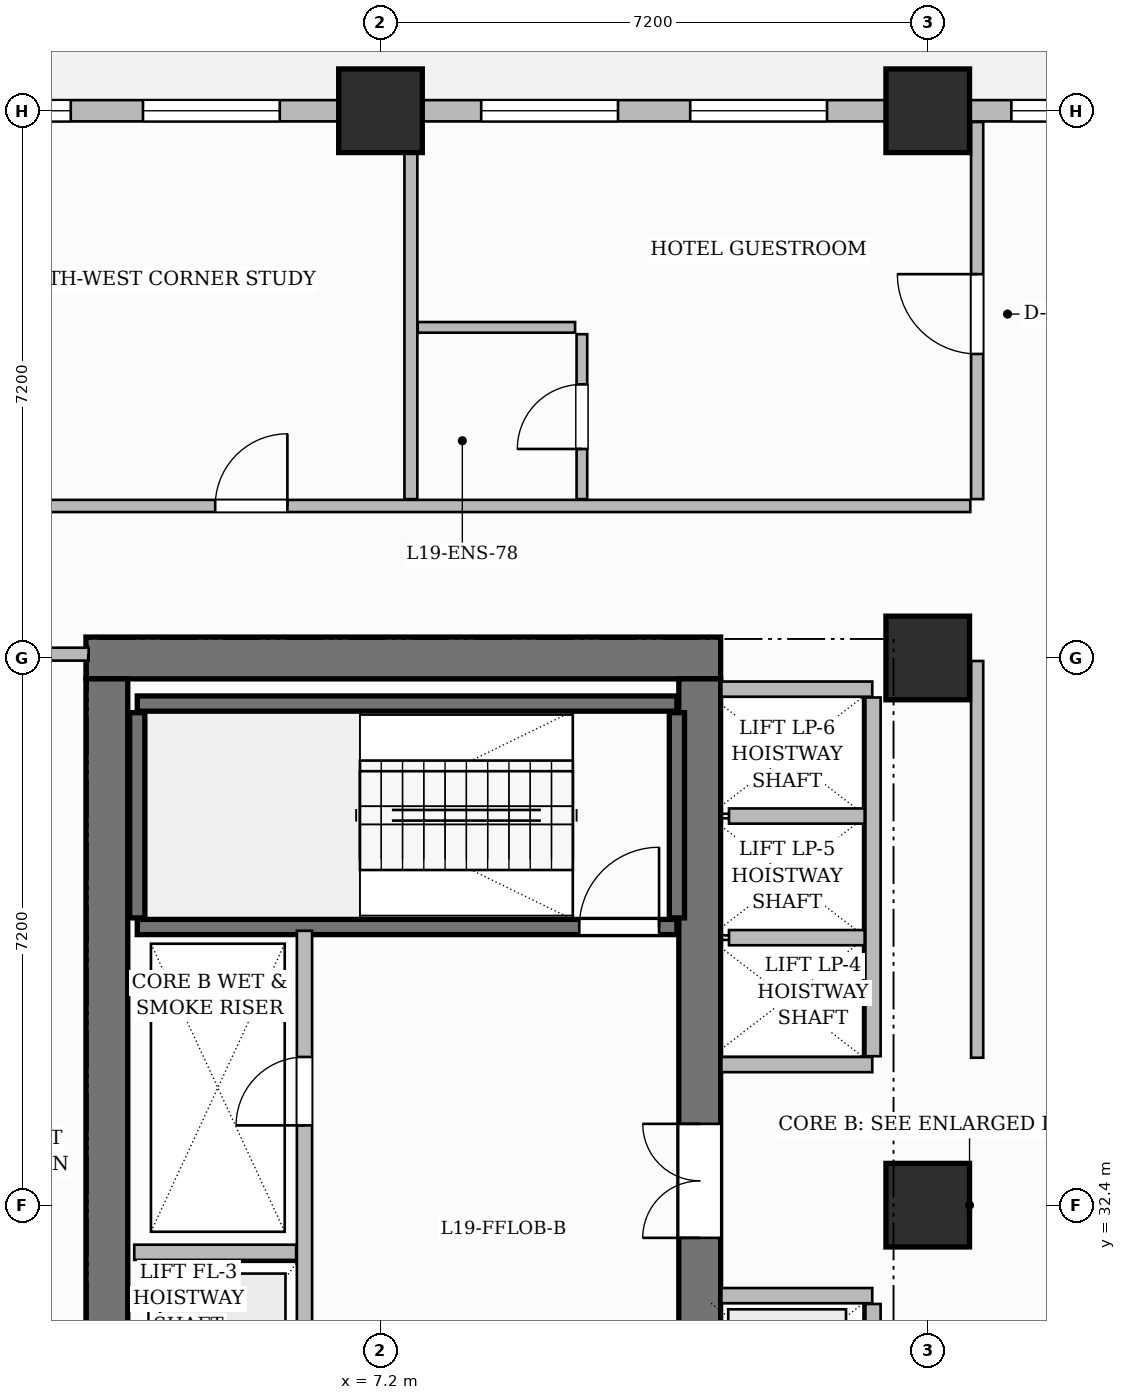
"""IFC4 building model, lengths in metres.
Left out: names, types, materials, properties, quantities, classifications, styles, units other than length and angle.
Written with IfcOpenShell. Run it as: python <this file> out.ifc"""

import sys

from ifc_helpers import new_model, si_unit, direction, frame, frame_2d, origin, origin_2d, place, context, subcontext, project, spatial, rectangle, extrude, source, transform, mapped, element, fill, save


model = new_model("IFC4")
c1 = context("Model", 3, precision=1e-05, world=origin(), true_north=direction((0.0, 1.0)))
c2 = subcontext(c1, "Body", "Model", "MODEL_VIEW")
j1 = project(units=[si_unit("LENGTHUNIT", "METRE"), si_unit("PLANEANGLEUNIT", "RADIAN")], contexts=[c1])
p1 = place(None, origin())
s1 = spatial("IfcSite", under=j1, at=p1, CompositionType="ELEMENT")
p2 = place(p1, origin())
s2 = spatial("IfcBuilding", under=s1, at=p2, CompositionType="ELEMENT")
p3 = place(p2, frame((0.0, 0.0, 80.5)))
s3 = spatial("IfcBuildingStorey", under=s2, at=p3, CompositionType="ELEMENT", Elevation=80.5)
p4 = place(p3, frame((3.325, 39.6, 0.0), z_axis=(0.0, 0.0, 1.0), x_axis=(1.0, 0.0, 0.0)))
e1 = element("IfcWall", 1, at=p4, inside=s3, PredefinedType="SHEAR", context=c2, shape_type="SweptSolid", body=[
    extrude(rectangle(XDim=8.35, YDim=0.55, at=frame_2d((4.175, 0.0))), origin(), (0.0, 0.0, 1.0), 3.7),
])
p5 = place(p3, frame((3.6, 25.475, 0.0), z_axis=(0.0, 0.0, 1.0), x_axis=(0.0, 1.0, 0.0)))
e2 = element("IfcWall", 2, at=p5, inside=s3, PredefinedType="SHEAR", context=c2, shape_type="SweptSolid", body=[
    extrude(rectangle(XDim=13.85, YDim=0.55, at=frame_2d((6.925, 0.0))), origin(), (0.0, 0.0, 1.0), 3.7),
])
p6 = place(p3, frame((11.4, 25.475, 0.0), z_axis=(0.0, 0.0, 1.0), x_axis=(0.0, 1.0, 0.0)))
e3 = element("IfcWall", 3, at=p6, inside=s3, PredefinedType="SHEAR", context=c2, shape_type="SweptSolid", body=[
    extrude(rectangle(XDim=13.85, YDim=0.55, at=frame_2d((6.925, 0.0))), origin(), (0.0, 0.0, 1.0), 3.7),
])
p7 = place(p6, frame((6.495, 0.0, 0.0)))
e4 = element("IfcOpeningElement", 4, at=p7, cuts=e3, PredefinedType="OPENING", context=c2, shape_type="SweptSolid", body=[
    extrude(rectangle(XDim=1.5, YDim=2.2, at=frame_2d((0.75, 1.1))), frame((0.0, 0.285, 0.0), z_axis=(0.0, -1.0, 0.0), x_axis=(1.0, 0.0, 0.0)), (0.0, 0.0, 1.0), 0.57),
])
m1 = source(origin(), c2, "Body", "SweptSolid", [
    extrude(rectangle(XDim=1.1, YDim=1.1, at=origin_2d()), origin(), (0.0, 0.0, 1.0), 3.7),
])
for number, where, z_axis, x_axis in (
    (5, (7.2, 46.8, 0.0), (0.0, 0.0, 1.0), (1.0, 0.0, 0.0)),
    (6, (14.4, 32.4, 0.0), (0.0, 0.0, 1.0), (1.0, 0.0, 0.0)),
    (7, (14.4, 39.6, 0.0), (0.0, 0.0, 1.0), (1.0, 0.0, 0.0)),
    (8, (14.4, 46.8, 0.0), (0.0, 0.0, 1.0), (1.0, 0.0, 0.0)),
):
    element("IfcColumn", number, at=place(p3, frame(where, z_axis=z_axis, x_axis=x_axis)), inside=s3, PredefinedType="COLUMN", context=c2, shape_type="MappedRepresentation", body=[
        mapped(m1, transform((0.0, 0.0, 0.0), scale=1.0)),
    ])
p8 = place(p3, frame((4.0, 39.0, 0.0), z_axis=(0.0, 0.0, 1.0), x_axis=(1.0, 0.0, 0.0)))
e9 = element("IfcWall", 9, at=p8, inside=s3, PredefinedType="SHEAR", context=c2, shape_type="SweptSolid", body=[
    extrude(rectangle(XDim=7.1, YDim=0.2, at=frame_2d((3.55, 0.0))), origin(), (0.0, 0.0, 1.0), 3.7),
])
for number, where, z_axis, x_axis in (
    (10, (4.0, 36.18, 0.0), (0.0, 0.0, 1.0), (0.0, 1.0, 0.0)),
    (11, (11.1, 36.18, 0.0), (0.0, 0.0, 1.0), (0.0, 1.0, 0.0)),
):
    element("IfcWall", number, at=place(p3, frame(where, z_axis=z_axis, x_axis=x_axis)), inside=s3, PredefinedType="SHEAR", context=c2, shape_type="SweptSolid", body=[
        extrude(rectangle(XDim=2.7, YDim=0.2, at=frame_2d((1.35, 0.0))), origin(), (0.0, 0.0, 1.0), 3.7),
    ])
p9 = place(p3, frame((4.0, 36.06, 0.0), z_axis=(0.0, 0.0, 1.0), x_axis=(1.0, 0.0, 0.0)))
e12 = element("IfcWall", 12, at=p9, inside=s3, PredefinedType="SHEAR", context=c2, shape_type="SweptSolid", body=[
    extrude(rectangle(XDim=7.1, YDim=0.2, at=frame_2d((3.55, 0.0))), origin(), (0.0, 0.0, 1.0), 3.7),
])
p10 = place(p9, frame((5.815, 0.0, 0.0)))
e13 = element("IfcOpeningElement", 13, at=p10, cuts=e12, PredefinedType="OPENING", context=c2, shape_type="SweptSolid", body=[
    extrude(rectangle(XDim=1.05, YDim=2.2, at=frame_2d((0.525, 1.1))), frame((0.0, 0.11, 0.0), z_axis=(0.0, -1.0, 0.0), x_axis=(1.0, 0.0, 0.0)), (0.0, 0.0, 1.0), 0.22),
])
p11 = place(p3, frame((6.2, 28.79, 0.0), z_axis=(0.0, 0.0, 1.0), x_axis=(0.0, 1.0, 0.0)))
e14 = element("IfcWall", 14, at=p11, inside=s3, PredefinedType="PARTITIONING", context=c2, shape_type="SweptSolid", body=[
    extrude(rectangle(XDim=7.22, YDim=0.2, at=frame_2d((3.61, 0.0))), origin(), (0.0, 0.0, 1.0), 3.45),
])
p12 = place(p11, frame((4.66, 0.0, 0.0)))
e15 = element("IfcOpeningElement", 15, at=p12, cuts=e14, PredefinedType="OPENING", context=c2, shape_type="SweptSolid", body=[
    extrude(rectangle(XDim=0.9, YDim=2.1, at=frame_2d((0.45, 1.05))), frame((0.0, 0.11, 0.0), z_axis=(0.0, -1.0, 0.0), x_axis=(1.0, 0.0, 0.0)), (0.0, 0.0, 1.0), 0.22),
])
p13 = place(p11, frame((0.96, 0.0, 0.0)))
e16 = element("IfcOpeningElement", 16, at=p13, cuts=e14, PredefinedType="OPENING", context=c2, shape_type="SweptSolid", body=[
    extrude(rectangle(XDim=1.1, YDim=2.2, at=frame_2d((0.55, 1.1))), frame((0.0, 0.11, 0.0), z_axis=(0.0, -1.0, 0.0), x_axis=(1.0, 0.0, 0.0)), (0.0, 0.0, 1.0), 0.22),
])
p14 = place(p3, frame((3.96, 31.78, 0.0), z_axis=(0.0, 0.0, 1.0), x_axis=(1.0, 0.0, 0.0)))
e17 = element("IfcWall", 17, at=p14, inside=s3, PredefinedType="PARTITIONING", context=c2, shape_type="SweptSolid", body=[
    extrude(rectangle(XDim=2.13, YDim=0.2, at=frame_2d((1.065, 0.0))), origin(), (0.0, 0.0, 1.0), 3.45),
])
p15 = place(p3, frame((11.685, 31.21, 0.0), z_axis=(0.0, 0.0, 1.0), x_axis=(1.0, 0.0, 0.0)))
e18 = element("IfcWall", 18, at=p15, inside=s3, PredefinedType="PARTITIONING", context=c2, shape_type="SweptSolid", body=[
    extrude(rectangle(XDim=1.985, YDim=0.2, at=frame_2d((0.992, 0.0))), origin(), (0.0, 0.0, 1.0), 3.45),
])
p16 = place(p3, frame((13.68, 26.16, 0.0), z_axis=(0.0, 0.0, 1.0), x_axis=(0.0, 1.0, 0.0)))
e19 = element("IfcWall", 19, at=p16, inside=s3, PredefinedType="PARTITIONING", context=c2, shape_type="SweptSolid", body=[
    extrude(rectangle(XDim=4.94, YDim=0.2, at=frame_2d((2.47, 0.0))), origin(), (0.0, 0.0, 1.0), 3.45),
])
p17 = place(p16, frame((0.24, 0.0, 0.0)))
e20 = element("IfcOpeningElement", 20, at=p17, cuts=e19, PredefinedType="OPENING", context=c2, shape_type="SweptSolid", body=[
    extrude(rectangle(XDim=1.1, YDim=2.2, at=frame_2d((0.55, 1.1))), frame((0.0, 0.11, 0.0), z_axis=(0.0, -1.0, 0.0), x_axis=(1.0, 0.0, 0.0)), (0.0, 0.0, 1.0), 0.22),
])
p18 = place(p16, frame((1.92, 0.0, 0.0)))
e21 = element("IfcOpeningElement", 21, at=p18, cuts=e19, PredefinedType="OPENING", context=c2, shape_type="SweptSolid", body=[
    extrude(rectangle(XDim=1.1, YDim=2.2, at=frame_2d((0.55, 1.1))), frame((0.0, 0.11, 0.0), z_axis=(0.0, -1.0, 0.0), x_axis=(1.0, 0.0, 0.0)), (0.0, 0.0, 1.0), 0.22),
])
p19 = place(p16, frame((3.6, 0.0, 0.0)))
e22 = element("IfcOpeningElement", 22, at=p19, cuts=e19, PredefinedType="OPENING", context=c2, shape_type="SweptSolid", body=[
    extrude(rectangle(XDim=1.1, YDim=2.2, at=frame_2d((0.55, 1.1))), frame((0.0, 0.11, 0.0), z_axis=(0.0, -1.0, 0.0), x_axis=(1.0, 0.0, 0.0)), (0.0, 0.0, 1.0), 0.22),
])
for number, where, z_axis, x_axis in (
    (23, (11.685, 34.25, 0.0), (0.0, 0.0, 1.0), (1.0, 0.0, 0.0)),
    (24, (11.685, 39.19, 0.0), (0.0, 0.0, 1.0), (1.0, 0.0, 0.0)),
):
    element("IfcWall", number, at=place(p3, frame(where, z_axis=z_axis, x_axis=x_axis)), inside=s3, PredefinedType="PARTITIONING", context=c2, shape_type="SweptSolid", body=[
        extrude(rectangle(XDim=1.985, YDim=0.2, at=frame_2d((0.992, 0.0))), origin(), (0.0, 0.0, 1.0), 3.45),
    ])
p20 = place(p3, frame((13.68, 34.36, 0.0), z_axis=(0.0, 0.0, 1.0), x_axis=(0.0, 1.0, 0.0)))
e25 = element("IfcWall", 25, at=p20, inside=s3, PredefinedType="PARTITIONING", context=c2, shape_type="SweptSolid", body=[
    extrude(rectangle(XDim=4.72, YDim=0.2, at=frame_2d((2.36, 0.0))), origin(), (0.0, 0.0, 1.0), 3.45),
])
for number, where, z_axis, x_axis in (
    (26, (11.785, 35.92, 0.0), (0.0, 0.0, 1.0), (1.0, 0.0, 0.0)),
    (27, (11.785, 37.52, 0.0), (0.0, 0.0, 1.0), (1.0, 0.0, 0.0)),
):
    element("IfcWall", number, at=place(p3, frame(where, z_axis=z_axis, x_axis=x_axis)), inside=s3, PredefinedType="PARTITIONING", context=c2, shape_type="SweptSolid", body=[
        extrude(rectangle(XDim=1.785, YDim=0.2, at=frame_2d((0.893, 0.0))), origin(), (0.0, 0.0, 1.0), 3.45),
    ])
p21 = place(p3, frame((0.24, 39.65, 0.0), z_axis=(0.0, 0.0, 1.0), x_axis=(1.0, 0.0, 0.0)))
e28 = element("IfcWall", 28, at=p21, inside=s3, PredefinedType="PARTITIONING", context=c2, shape_type="SweptSolid", body=[
    extrude(rectangle(XDim=3.12, YDim=0.17, at=frame_2d((1.56, 0.0))), origin(), (0.0, 0.0, 1.0), 3.45),
])
p22 = place(p21, frame((1.11, 0.0, 0.0)))
e29 = element("IfcOpeningElement", 29, at=p22, cuts=e28, PredefinedType="OPENING", context=c2, shape_type="SweptSolid", body=[
    extrude(rectangle(XDim=0.9, YDim=2.15, at=frame_2d((0.45, 1.075))), frame((0.0, 0.095, 0.0), z_axis=(0.0, -1.0, 0.0), x_axis=(1.0, 0.0, 0.0)), (0.0, 0.0, 1.0), 0.19),
])
p23 = place(p3, frame((15.05, 34.34, 0.0), z_axis=(0.0, 0.0, 1.0), x_axis=(0.0, 1.0, 0.0)))
e30 = element("IfcWall", 30, at=p23, inside=s3, PredefinedType="PARTITIONING", context=c2, shape_type="SweptSolid", body=[
    extrude(rectangle(XDim=5.22, YDim=0.16, at=frame_2d((2.61, 0.0))), origin(), (0.0, 0.0, 1.0), 3.45),
])
p24 = place(p3, frame((15.05, 41.69, 0.0), z_axis=(0.0, 0.0, 1.0), x_axis=(0.0, 1.0, 0.0)))
e31 = element("IfcWall", 31, at=p24, inside=s3, PredefinedType="PARTITIONING", context=c2, shape_type="SweptSolid", body=[
    extrude(rectangle(XDim=4.962, YDim=0.16, at=frame_2d((2.481, 0.0))), origin(), (0.0, 0.0, 1.0), 3.45),
])
p25 = place(p24, frame((1.91, 0.0, 0.0)))
e32 = element("IfcOpeningElement", 32, at=p25, cuts=e31, PredefinedType="OPENING", context=c2, shape_type="SweptSolid", body=[
    extrude(rectangle(XDim=1.05, YDim=2.25, at=frame_2d((0.525, 1.125))), frame((0.0, 0.09, 0.0), z_axis=(0.0, -1.0, 0.0), x_axis=(1.0, 0.0, 0.0)), (0.0, 0.0, 1.0), 0.18),
])
p26 = place(p3, frame((7.6, 41.69, 0.0), z_axis=(0.0, 0.0, 1.0), x_axis=(0.0, 1.0, 0.0)))
e33 = element("IfcWall", 33, at=p26, inside=s3, PredefinedType="PARTITIONING", context=c2, shape_type="SweptSolid", body=[
    extrude(rectangle(XDim=4.87, YDim=0.17, at=frame_2d((2.435, 0.0))), origin(), (0.0, 0.0, 1.0), 3.45),
])
p27 = place(p3, frame((0.148, 41.6, 0.0), z_axis=(0.0, 0.0, 1.0), x_axis=(1.0, 0.0, 0.0)))
e34 = element("IfcWall", 34, at=p27, inside=s3, PredefinedType="PARTITIONING", context=c2, shape_type="SweptSolid", body=[
    extrude(rectangle(XDim=14.812, YDim=0.16, at=frame_2d((7.406, 0.0))), origin(), (0.0, 0.0, 1.0), 2.885),
])
p28 = place(p27, frame((4.877, 0.0, 0.0)))
e35 = element("IfcOpeningElement", 35, at=p28, cuts=e34, PredefinedType="OPENING", context=c2, shape_type="SweptSolid", body=[
    extrude(rectangle(XDim=0.95, YDim=2.15, at=frame_2d((0.475, 1.075))), frame((0.0, 0.09, 0.0), z_axis=(0.0, -1.0, 0.0), x_axis=(1.0, 0.0, 0.0)), (0.0, 0.0, 1.0), 0.18),
])
p29 = place(p3, frame((7.69, 43.95, 0.0), z_axis=(0.0, 0.0, 1.0), x_axis=(1.0, 0.0, 0.0)))
e36 = element("IfcWall", 36, at=p29, inside=s3, PredefinedType="PARTITIONING", context=c2, shape_type="SweptSolid", body=[
    extrude(rectangle(XDim=2.07, YDim=0.14, at=frame_2d((1.035, 0.0))), origin(), (0.0, 0.0, 1.0), 2.885),
])
p30 = place(p3, frame((9.85, 41.69, 0.0), z_axis=(0.0, 0.0, 1.0), x_axis=(0.0, 1.0, 0.0)))
e37 = element("IfcWall", 37, at=p30, inside=s3, PredefinedType="PARTITIONING", context=c2, shape_type="SweptSolid", body=[
    extrude(rectangle(XDim=2.17, YDim=0.14, at=frame_2d((1.085, 0.0))), origin(), (0.0, 0.0, 1.0), 3.45),
])
p31 = place(p30, frame((0.66, 0.0, 0.0)))
e38 = element("IfcOpeningElement", 38, at=p31, cuts=e37, PredefinedType="OPENING", context=c2, shape_type="SweptSolid", body=[
    extrude(rectangle(XDim=0.85, YDim=2.1, at=frame_2d((0.425, 1.05))), frame((0.0, 0.08, 0.0), z_axis=(0.0, -1.0, 0.0), x_axis=(1.0, 0.0, 0.0)), (0.0, 0.0, 1.0), 0.16),
])
p32 = place(p3, frame((0.0, 46.8, 0.0), z_axis=(0.0, 0.0, 1.0), x_axis=(1.0, 0.0, 0.0)))
e39 = element("IfcWall", 39, at=p32, inside=s3, PredefinedType="SOLIDWALL", context=c2, shape_type="SweptSolid", body=[
    extrude(rectangle(XDim=18.0, YDim=0.28, at=frame_2d((9.0, 0.0))), origin(), (0.0, 0.0, 1.0), 2.885),
])
p33 = place(p32, frame((1.325, 0.0, 0.8)))
e40 = element("IfcOpeningElement", 40, at=p33, cuts=e39, PredefinedType="OPENING", context=c2, shape_type="SweptSolid", body=[
    extrude(rectangle(XDim=1.8, YDim=1.85, at=frame_2d((0.9, 0.925))), frame((0.0, 0.15, 0.0), z_axis=(0.0, -1.0, 0.0), x_axis=(1.0, 0.0, 0.0)), (0.0, 0.0, 1.0), 0.3),
])
p34 = place(p32, frame((4.075, 0.0, 0.8)))
e41 = element("IfcOpeningElement", 41, at=p34, cuts=e39, PredefinedType="OPENING", context=c2, shape_type="SweptSolid", body=[
    extrude(rectangle(XDim=1.8, YDim=1.85, at=frame_2d((0.9, 0.925))), frame((0.0, 0.15, 0.0), z_axis=(0.0, -1.0, 0.0), x_axis=(1.0, 0.0, 0.0)), (0.0, 0.0, 1.0), 0.3),
])
p35 = place(p32, frame((8.525, 0.0, 0.8)))
e42 = element("IfcOpeningElement", 42, at=p35, cuts=e39, PredefinedType="OPENING", context=c2, shape_type="SweptSolid", body=[
    extrude(rectangle(XDim=1.8, YDim=1.85, at=frame_2d((0.9, 0.925))), frame((0.0, 0.15, 0.0), z_axis=(0.0, -1.0, 0.0), x_axis=(1.0, 0.0, 0.0)), (0.0, 0.0, 1.0), 0.3),
])
p36 = place(p32, frame((11.275, 0.0, 0.8)))
e43 = element("IfcOpeningElement", 43, at=p36, cuts=e39, PredefinedType="OPENING", context=c2, shape_type="SweptSolid", body=[
    extrude(rectangle(XDim=1.8, YDim=1.85, at=frame_2d((0.9, 0.925))), frame((0.0, 0.15, 0.0), z_axis=(0.0, -1.0, 0.0), x_axis=(1.0, 0.0, 0.0)), (0.0, 0.0, 1.0), 0.3),
])
p37 = place(p32, frame((15.5, 0.0, 0.8)))
e44 = element("IfcOpeningElement", 44, at=p37, cuts=e39, PredefinedType="OPENING", context=c2, shape_type="SweptSolid", body=[
    extrude(rectangle(XDim=1.4, YDim=1.85, at=frame_2d((0.7, 0.925))), frame((0.0, 0.15, 0.0), z_axis=(0.0, -1.0, 0.0), x_axis=(1.0, 0.0, 0.0)), (0.0, 0.0, 1.0), 0.3),
])
m2 = source(origin(), c2, "Body", "SweptSolid", [
    extrude(rectangle(XDim=1.05, YDim=2.2, at=frame_2d((0.525, 1.1))), frame((0.0, 0.025, 0.0), z_axis=(0.0, -1.0, 0.0), x_axis=(1.0, 0.0, 0.0)), (0.0, 0.0, 1.0), 0.05),
])
p38 = place(p10, origin())
e45 = element("IfcDoor", 45, at=p38, inside=s3, OperationType="SINGLE_SWING_RIGHT", PredefinedType="DOOR", context=c2, shape_type="MappedRepresentation", body=[
    mapped(m2, transform((0.0, 0.0, 0.0), scale=1.0)),
])
fill(e13, e45)
m3 = source(origin(), c2, "Body", "SweptSolid", [
    extrude(rectangle(XDim=0.9, YDim=2.1, at=frame_2d((0.45, 1.05))), frame((0.0, 0.025, 0.0), z_axis=(0.0, -1.0, 0.0), x_axis=(1.0, 0.0, 0.0)), (0.0, 0.0, 1.0), 0.05),
])
p39 = place(p12, origin())
e46 = element("IfcDoor", 46, at=p39, inside=s3, OperationType="SINGLE_SWING_LEFT", PredefinedType="DOOR", context=c2, shape_type="MappedRepresentation", body=[
    mapped(m3, transform((0.0, 0.0, 0.0), scale=1.0)),
])
fill(e15, e46)
m4 = source(origin(), c2, "Body", "SweptSolid", [
    extrude(rectangle(XDim=1.5, YDim=2.2, at=frame_2d((0.75, 1.1))), frame((0.0, 0.025, 0.0), z_axis=(0.0, -1.0, 0.0), x_axis=(1.0, 0.0, 0.0)), (0.0, 0.0, 1.0), 0.05),
])
p40 = place(p7, origin())
e47 = element("IfcDoor", 47, at=p40, inside=s3, OperationType="DOUBLE_DOOR_SINGLE_SWING", PredefinedType="DOOR", context=c2, shape_type="MappedRepresentation", body=[
    mapped(m4, transform((0.0, 0.0, 0.0), scale=1.0)),
])
fill(e4, e47)
m5 = source(origin(), c2, "Body", "SweptSolid", [
    extrude(rectangle(XDim=0.95, YDim=2.15, at=frame_2d((0.475, 1.075))), frame((0.0, 0.025, 0.0), z_axis=(0.0, -1.0, 0.0), x_axis=(1.0, 0.0, 0.0)), (0.0, 0.0, 1.0), 0.05),
])
p41 = place(p28, origin())
e48 = element("IfcDoor", 48, at=p41, inside=s3, OperationType="SINGLE_SWING_RIGHT", PredefinedType="DOOR", context=c2, shape_type="MappedRepresentation", body=[
    mapped(m5, transform((0.0, 0.0, 0.0), scale=1.0)),
])
fill(e35, e48)
m6 = source(origin(), c2, "Body", "SweptSolid", [
    extrude(rectangle(XDim=0.85, YDim=2.1, at=frame_2d((0.425, 1.05))), frame((0.0, 0.025, 0.0), z_axis=(0.0, -1.0, 0.0), x_axis=(1.0, 0.0, 0.0)), (0.0, 0.0, 1.0), 0.05),
])
p42 = place(p31, origin())
e49 = element("IfcDoor", 49, at=p42, inside=s3, OperationType="SINGLE_SWING_LEFT", PredefinedType="DOOR", context=c2, shape_type="MappedRepresentation", body=[
    mapped(m6, transform((0.0, 0.0, 0.0), scale=1.0)),
])
fill(e38, e49)
m7 = source(origin(), c2, "Body", "SweptSolid", [
    extrude(rectangle(XDim=1.05, YDim=2.25, at=frame_2d((0.525, 1.125))), frame((0.0, 0.025, 0.0), z_axis=(0.0, -1.0, 0.0), x_axis=(1.0, 0.0, 0.0)), (0.0, 0.0, 1.0), 0.05),
])
p43 = place(p25, origin())
e50 = element("IfcDoor", 50, at=p43, inside=s3, OperationType="SINGLE_SWING_RIGHT", PredefinedType="DOOR", context=c2, shape_type="MappedRepresentation", body=[
    mapped(m7, transform((0.0, 0.0, 0.0), scale=1.0)),
])
fill(e32, e50)
m8 = source(origin(), c2, "Body", "SweptSolid", [
    extrude(rectangle(XDim=1.8, YDim=1.85, at=frame_2d((0.9, 0.925))), frame((0.0, 0.03, 0.0), z_axis=(0.0, -1.0, 0.0), x_axis=(1.0, 0.0, 0.0)), (0.0, 0.0, 1.0), 0.06),
])
p44 = place(p33, origin())
e51 = element("IfcWindow", 51, at=p44, inside=s3, PartitioningType="DOUBLE_PANEL_VERTICAL", PredefinedType="WINDOW", context=c2, shape_type="MappedRepresentation", body=[
    mapped(m8, transform((0.0, 0.0, 0.0), scale=1.0)),
])
fill(e40, e51)
p45 = place(p34, origin())
e52 = element("IfcWindow", 52, at=p45, inside=s3, PartitioningType="DOUBLE_PANEL_VERTICAL", PredefinedType="WINDOW", context=c2, shape_type="MappedRepresentation", body=[
    mapped(m8, transform((0.0, 0.0, 0.0), scale=1.0)),
])
fill(e41, e52)
p46 = place(p35, origin())
e53 = element("IfcWindow", 53, at=p46, inside=s3, PartitioningType="DOUBLE_PANEL_VERTICAL", PredefinedType="WINDOW", context=c2, shape_type="MappedRepresentation", body=[
    mapped(m8, transform((0.0, 0.0, 0.0), scale=1.0)),
])
fill(e42, e53)
p47 = place(p36, origin())
e54 = element("IfcWindow", 54, at=p47, inside=s3, PartitioningType="DOUBLE_PANEL_VERTICAL", PredefinedType="WINDOW", context=c2, shape_type="MappedRepresentation", body=[
    mapped(m8, transform((0.0, 0.0, 0.0), scale=1.0)),
])
fill(e43, e54)
m9 = source(origin(), c2, "Body", "SweptSolid", [
    extrude(rectangle(XDim=1.4, YDim=1.85, at=frame_2d((0.7, 0.925))), frame((0.0, 0.03, 0.0), z_axis=(0.0, -1.0, 0.0), x_axis=(1.0, 0.0, 0.0)), (0.0, 0.0, 1.0), 0.06),
])
p48 = place(p37, origin())
e55 = element("IfcWindow", 55, at=p48, inside=s3, PartitioningType="SINGLE_PANEL", PredefinedType="WINDOW", context=c2, shape_type="MappedRepresentation", body=[
    mapped(m9, transform((0.0, 0.0, 0.0), scale=1.0)),
])
fill(e44, e55)
save(model, sys.argv[1])
